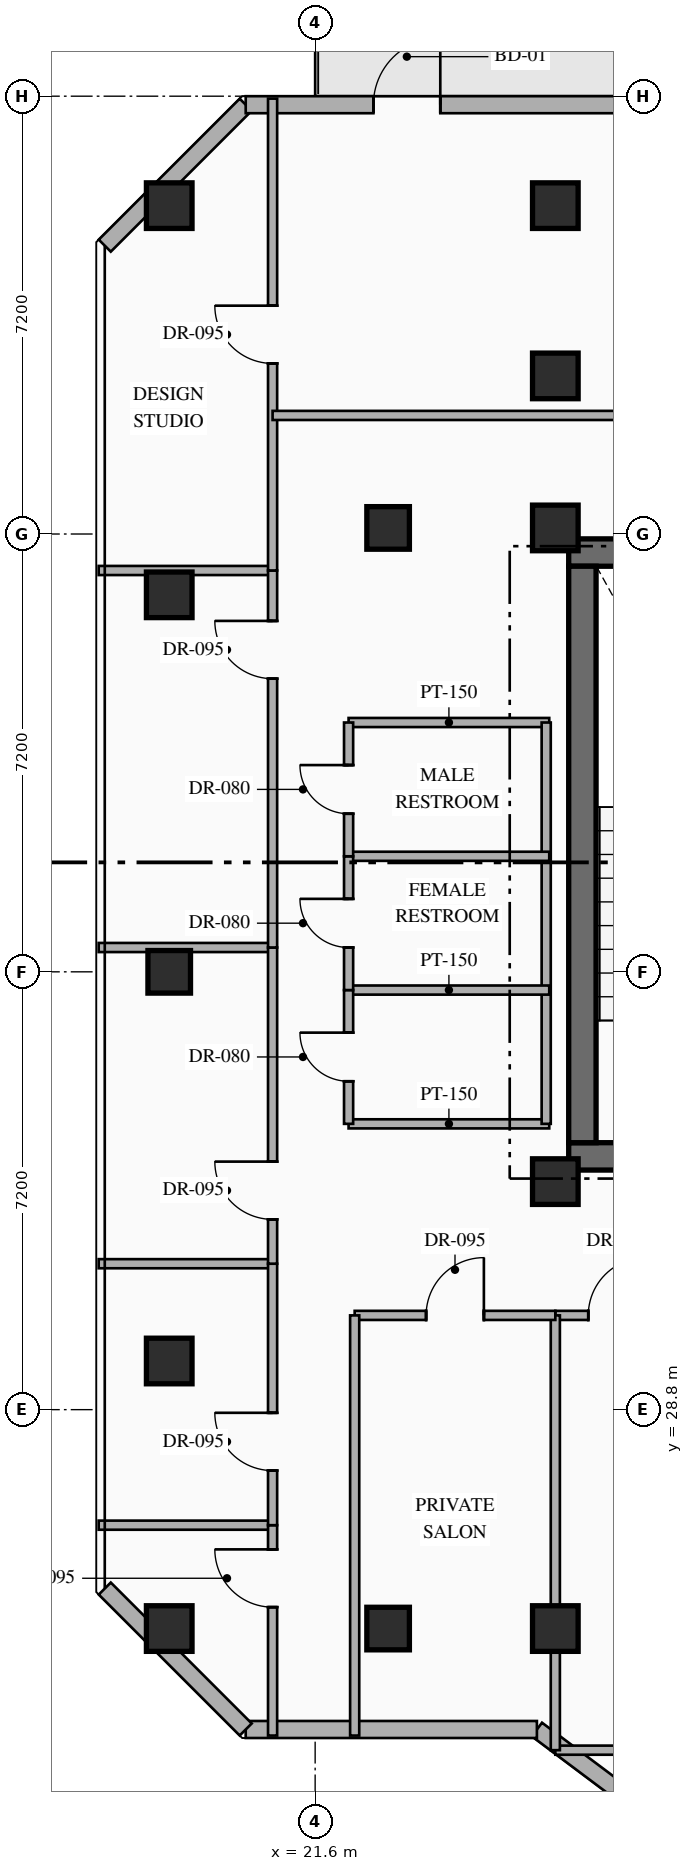
"""IFC4 building model, lengths in metres.
Left out: names, types, materials, properties, quantities, classifications, styles, units other than length and angle.
Written with IfcOpenShell. Run it as: python <this file> out.ifc"""

import sys

from ifc_helpers import new_model, si_unit, direction, frame, frame_2d, origin, origin_2d, place, context, subcontext, project, spatial, rectangle, hollow_rectangle, extrude, element, fill, save


model = new_model("IFC4")
c1 = context("Model", 3, precision=1e-05, world=origin(), true_north=direction((0.0, 1.0)))
c2 = subcontext(c1, "Body", "Model", "MODEL_VIEW")
j1 = project(units=[si_unit("LENGTHUNIT", "METRE"), si_unit("PLANEANGLEUNIT", "RADIAN")], contexts=[c1])
p1 = place(None, origin())
s1 = spatial("IfcSite", under=j1, at=p1, CompositionType="ELEMENT")
p2 = place(p1, origin())
s2 = spatial("IfcBuilding", under=s1, at=p2, CompositionType="ELEMENT")
p3 = place(p2, frame((0.0, 0.0, 213.15)))
s3 = spatial("IfcBuildingStorey", under=s2, at=p3, CompositionType="ELEMENT", Elevation=213.15)
p4 = place(p3, frame((25.77, 32.965, 0.0), z_axis=(0.0, 0.0, 1.0), x_axis=(1.0, 0.0, 0.0)))
e1 = element("IfcWall", 1, at=p4, inside=s3, PredefinedType="SHEAR", context=c2, shape_type="SweptSolid", body=[
    extrude(rectangle(XDim=7.48, YDim=0.45, at=frame_2d((3.74, 0.0))), origin(), (0.0, 0.0, 1.0), 3.6),
])
p5 = place(p4, frame((2.68, 0.0, 0.0)))
e2 = element("IfcOpeningElement", 2, at=p5, cuts=e1, PredefinedType="OPENING", context=c2, shape_type="SweptSolid", body=[
    extrude(rectangle(XDim=1.1, YDim=2.2, at=frame_2d((0.55, 1.1))), frame((0.0, 0.235, 0.0), z_axis=(0.0, -1.0, 0.0), x_axis=(1.0, 0.0, 0.0)), (0.0, 0.0, 1.0), 0.47),
])
p6 = place(p4, frame((5.43, 0.0, 0.0)))
e3 = element("IfcOpeningElement", 3, at=p6, cuts=e1, PredefinedType="OPENING", context=c2, shape_type="SweptSolid", body=[
    extrude(rectangle(XDim=1.1, YDim=2.15, at=frame_2d((0.55, 1.075))), frame((0.0, 0.235, 0.0), z_axis=(0.0, -1.0, 0.0), x_axis=(1.0, 0.0, 0.0)), (0.0, 0.0, 1.0), 0.47),
])
p7 = place(p3, frame((25.77, 42.895, 0.0), z_axis=(0.0, 0.0, 1.0), x_axis=(1.0, 0.0, 0.0)))
e4 = element("IfcWall", 4, at=p7, inside=s3, PredefinedType="SHEAR", context=c2, shape_type="SweptSolid", body=[
    extrude(rectangle(XDim=7.48, YDim=0.45, at=frame_2d((3.74, 0.0))), origin(), (0.0, 0.0, 1.0), 3.6),
])
p8 = place(p3, frame((25.995, 33.19, 0.0), z_axis=(0.0, 0.0, 1.0), x_axis=(0.0, 1.0, 0.0)))
e5 = element("IfcWall", 5, at=p8, inside=s3, PredefinedType="SHEAR", context=c2, shape_type="SweptSolid", body=[
    extrude(rectangle(XDim=9.48, YDim=0.45, at=frame_2d((4.74, 0.0))), origin(), (0.0, 0.0, 1.0), 3.6),
])
for number, where, z_axis, x_axis in (
    (6, (25.55, 32.55, 0.0), (0.0, 0.0, 1.0), (1.0, 0.0, 0.0)),
    (7, (25.55, 43.3, 0.0), (0.0, 0.0, 1.0), (1.0, 0.0, 0.0)),
    (8, (25.55, 25.2, 0.0), (0.0, 0.0, 1.0), (1.0, 0.0, 0.0)),
    (9, (25.55, 45.8, 0.0), (0.0, 0.0, 1.0), (1.0, 0.0, 0.0)),
    (10, (19.2, 48.6, 0.0), (0.0, 0.0, 1.0), (1.0, 0.0, 0.0)),
    (11, (25.55, 48.6, 0.0), (0.0, 0.0, 1.0), (1.0, 0.0, 0.0)),
    (12, (19.2, 25.2, 0.0), (0.0, 0.0, 1.0), (1.0, 0.0, 0.0)),
    (13, (19.2, 29.6, 0.0), (0.0, 0.0, 1.0), (1.0, 0.0, 0.0)),
    (14, (19.2, 42.2, 0.0), (0.0, 0.0, 1.0), (1.0, 0.0, 0.0)),
):
    element("IfcColumn", number, at=place(p3, frame(where, z_axis=z_axis, x_axis=x_axis)), inside=s3, PredefinedType="COLUMN", context=c2, shape_type="SweptSolid", body=[
        extrude(hollow_rectangle(XDim=0.75, YDim=0.75, WallThickness=0.028, at=origin_2d()), origin(), (0.0, 0.0, 1.0), 3.6),
    ])
for number, where, z_axis, x_axis in (
    (15, (22.8, 25.2, 0.0), (0.0, 0.0, 1.0), (1.0, 0.0, 0.0)),
    (16, (22.8, 43.3, 0.0), (0.0, 0.0, 1.0), (1.0, 0.0, 0.0)),
    (17, (19.2, 36.0, 0.0), (0.0, 0.0, 1.0), (1.0, 0.0, 0.0)),
):
    element("IfcColumn", number, at=place(p3, frame(where, z_axis=z_axis, x_axis=x_axis)), inside=s3, PredefinedType="COLUMN", context=c2, shape_type="SweptSolid", body=[
        extrude(hollow_rectangle(XDim=0.7, YDim=0.7, WallThickness=0.028, at=origin_2d()), origin(), (0.0, 0.0, 1.0), 3.6),
    ])
p9 = place(p3, frame((44.918, 8.787, 0.0), z_axis=(0.0, 0.0, 1.0), x_axis=(-0.800004765927, 0.599993645378, 0.0)))
e18 = element("IfcWall", 18, at=p9, inside=s3, PredefinedType="STANDARD", context=c2, shape_type="SweptSolid", body=[
    extrude(rectangle(XDim=24.588, YDim=0.28, at=frame_2d((12.294, 0.0))), origin(), (0.0, 0.0, 1.0), 3.35),
])
p10 = place(p3, frame((25.247, 23.54, 0.0), z_axis=(0.0, 0.0, 1.0), x_axis=(-1.0, 0.0, 0.0)))
e19 = element("IfcWall", 19, at=p10, inside=s3, PredefinedType="STANDARD", context=c2, shape_type="SweptSolid", body=[
    extrude(rectangle(XDim=4.789, YDim=0.28, at=frame_2d((2.395, 0.0))), origin(), (0.0, 0.0, 1.0), 3.35),
])
p11 = place(p3, frame((20.458, 23.54, 0.0), z_axis=(0.0, 0.0, 1.0), x_axis=(-0.707144017911, 0.707069542501, 0.0)))
e20 = element("IfcWall", 20, at=p11, inside=s3, PredefinedType="STANDARD", context=c2, shape_type="SweptSolid", body=[
    extrude(rectangle(XDim=3.278, YDim=0.28, at=frame_2d((1.639, 0.0))), origin(), (0.0, 0.0, 1.0), 3.35),
])
p12 = place(p3, frame((18.14, 47.942, 0.0), z_axis=(0.0, 0.0, 1.0), x_axis=(0.707106781187, 0.707106781187, 0.0)))
e21 = element("IfcWall", 21, at=p12, inside=s3, PredefinedType="STANDARD", context=c2, shape_type="SweptSolid", body=[
    extrude(rectangle(XDim=3.278, YDim=0.28, at=frame_2d((1.639, 0.0))), origin(), (0.0, 0.0, 1.0), 3.35),
])
p13 = place(p3, frame((20.458, 50.26, 0.0), z_axis=(0.0, 0.0, 1.0), x_axis=(1.0, 0.0, 0.0)))
e22 = element("IfcWall", 22, at=p13, inside=s3, PredefinedType="STANDARD", context=c2, shape_type="SweptSolid", body=[
    extrude(rectangle(XDim=22.084, YDim=0.28, at=frame_2d((11.042, 0.0))), origin(), (0.0, 0.0, 1.0), 3.35),
])
p14 = place(p13, frame((2.1, 0.0, 0.0)))
e23 = element("IfcOpeningElement", 23, at=p14, cuts=e22, PredefinedType="OPENING", context=c2, shape_type="SweptSolid", body=[
    extrude(rectangle(XDim=1.1, YDim=2.2, at=frame_2d((0.55, 1.1))), frame((0.0, 0.15, 0.0), z_axis=(0.0, -1.0, 0.0), x_axis=(1.0, 0.0, 0.0)), (0.0, 0.0, 1.0), 0.3),
])
p15 = place(p13, frame((15.663, 0.0, 0.85)))
e24 = element("IfcOpeningElement", 24, at=p15, cuts=e22, PredefinedType="OPENING", context=c2, shape_type="SweptSolid", body=[
    extrude(rectangle(XDim=1.8, YDim=2.1, at=frame_2d((0.9, 1.05))), frame((0.0, 0.15, 0.0), z_axis=(0.0, -1.0, 0.0), x_axis=(1.0, 0.0, 0.0)), (0.0, 0.0, 1.0), 0.3),
])
for number, where, z_axis, x_axis in (
    (25, (22.15, 33.5, 0.0), (0.0, 0.0, 1.0), (1.0, 0.0, 0.0)),
    (26, (22.15, 40.1, 0.0), (0.0, 0.0, 1.0), (1.0, 0.0, 0.0)),
):
    element("IfcWall", number, at=place(p3, frame(where, z_axis=z_axis, x_axis=x_axis)), inside=s3, PredefinedType="PARTITIONING", context=c2, shape_type="SweptSolid", body=[
        extrude(rectangle(XDim=3.3, YDim=0.15, at=frame_2d((1.65, 0.0))), origin(), (0.0, 0.0, 1.0), 3.35),
    ])
p16 = place(p3, frame((25.4, 33.5, 0.0), z_axis=(0.0, 0.0, 1.0), x_axis=(0.0, 1.0, 0.0)))
e27 = element("IfcWall", 27, at=p16, inside=s3, PredefinedType="PARTITIONING", context=c2, shape_type="SweptSolid", body=[
    extrude(rectangle(XDim=6.6, YDim=0.15, at=frame_2d((3.3, 0.0))), origin(), (0.0, 0.0, 1.0), 3.35),
])
for number, where, z_axis, x_axis in (
    (28, (22.15, 35.7, 0.0), (0.0, 0.0, 1.0), (1.0, 0.0, 0.0)),
    (29, (22.15, 37.9, 0.0), (0.0, 0.0, 1.0), (1.0, 0.0, 0.0)),
):
    element("IfcWall", number, at=place(p3, frame(where, z_axis=z_axis, x_axis=x_axis)), inside=s3, PredefinedType="PARTITIONING", context=c2, shape_type="SweptSolid", body=[
        extrude(rectangle(XDim=3.3, YDim=0.15, at=frame_2d((1.65, 0.0))), origin(), (0.0, 0.0, 1.0), 3.35),
    ])
p17 = place(p3, frame((22.15, 33.5, 0.0), z_axis=(0.0, 0.0, 1.0), x_axis=(0.0, 1.0, 0.0)))
e30 = element("IfcWall", 30, at=p17, inside=s3, PredefinedType="PARTITIONING", context=c2, shape_type="SweptSolid", body=[
    extrude(rectangle(XDim=2.2, YDim=0.15, at=frame_2d((1.1, 0.0))), origin(), (0.0, 0.0, 1.0), 3.35),
])
p18 = place(p17, frame((0.7, 0.0, 0.0)))
e31 = element("IfcOpeningElement", 31, at=p18, cuts=e30, PredefinedType="OPENING", context=c2, shape_type="SweptSolid", body=[
    extrude(rectangle(XDim=0.8, YDim=2.06, at=frame_2d((0.4, 1.03))), frame((0.0, 0.085, 0.0), z_axis=(0.0, -1.0, 0.0), x_axis=(1.0, 0.0, 0.0)), (0.0, 0.0, 1.0), 0.17),
])
p19 = place(p3, frame((22.15, 35.7, 0.0), z_axis=(0.0, 0.0, 1.0), x_axis=(0.0, 1.0, 0.0)))
e32 = element("IfcWall", 32, at=p19, inside=s3, PredefinedType="PARTITIONING", context=c2, shape_type="SweptSolid", body=[
    extrude(rectangle(XDim=2.2, YDim=0.15, at=frame_2d((1.1, 0.0))), origin(), (0.0, 0.0, 1.0), 3.35),
])
p20 = place(p19, frame((0.7, 0.0, 0.0)))
e33 = element("IfcOpeningElement", 33, at=p20, cuts=e32, PredefinedType="OPENING", context=c2, shape_type="SweptSolid", body=[
    extrude(rectangle(XDim=0.8, YDim=2.06, at=frame_2d((0.4, 1.03))), frame((0.0, 0.085, 0.0), z_axis=(0.0, -1.0, 0.0), x_axis=(1.0, 0.0, 0.0)), (0.0, 0.0, 1.0), 0.17),
])
p21 = place(p3, frame((22.15, 37.9, 0.0), z_axis=(0.0, 0.0, 1.0), x_axis=(0.0, 1.0, 0.0)))
e34 = element("IfcWall", 34, at=p21, inside=s3, PredefinedType="PARTITIONING", context=c2, shape_type="SweptSolid", body=[
    extrude(rectangle(XDim=2.2, YDim=0.15, at=frame_2d((1.1, 0.0))), origin(), (0.0, 0.0, 1.0), 3.35),
])
p22 = place(p21, frame((0.7, 0.0, 0.0)))
e35 = element("IfcOpeningElement", 35, at=p22, cuts=e34, PredefinedType="OPENING", context=c2, shape_type="SweptSolid", body=[
    extrude(rectangle(XDim=0.8, YDim=2.06, at=frame_2d((0.4, 1.03))), frame((0.0, 0.085, 0.0), z_axis=(0.0, -1.0, 0.0), x_axis=(1.0, 0.0, 0.0)), (0.0, 0.0, 1.0), 0.17),
])
p23 = place(p3, frame((25.55, 23.2, 0.0), z_axis=(0.0, 0.0, 1.0), x_axis=(1.0, 0.0, 0.0)))
e36 = element("IfcWall", 36, at=p23, inside=s3, PredefinedType="PARTITIONING", context=c2, shape_type="SweptSolid", body=[
    extrude(rectangle(XDim=4.95, YDim=0.15, at=frame_2d((2.475, 0.0))), origin(), (0.0, 0.0, 1.0), 3.35),
])
p24 = place(p3, frame((25.55, 30.35, 0.0), z_axis=(0.0, 0.0, 1.0), x_axis=(1.0, 0.0, 0.0)))
e37 = element("IfcWall", 37, at=p24, inside=s3, PredefinedType="PARTITIONING", context=c2, shape_type="SweptSolid", body=[
    extrude(rectangle(XDim=4.95, YDim=0.15, at=frame_2d((2.475, 0.0))), origin(), (0.0, 0.0, 1.0), 3.35),
])
p25 = place(p24, frame((0.542, 0.0, 0.0)))
e38 = element("IfcOpeningElement", 38, at=p25, cuts=e37, PredefinedType="OPENING", context=c2, shape_type="SweptSolid", body=[
    extrude(rectangle(XDim=0.95, YDim=2.15, at=frame_2d((0.475, 1.075))), frame((0.0, 0.085, 0.0), z_axis=(0.0, -1.0, 0.0), x_axis=(1.0, 0.0, 0.0)), (0.0, 0.0, 1.0), 0.17),
])
p26 = place(p3, frame((25.55, 23.2, 0.0), z_axis=(0.0, 0.0, 1.0), x_axis=(0.0, 1.0, 0.0)))
e39 = element("IfcWall", 39, at=p26, inside=s3, PredefinedType="PARTITIONING", context=c2, shape_type="SweptSolid", body=[
    extrude(rectangle(XDim=7.15, YDim=0.15, at=frame_2d((3.575, 0.0))), origin(), (0.0, 0.0, 1.0), 2.757),
])
p27 = place(p3, frame((18.04, 26.9, 0.0), z_axis=(0.0, 0.0, 1.0), x_axis=(1.0, 0.0, 0.0)))
e40 = element("IfcWall", 40, at=p27, inside=s3, PredefinedType="PARTITIONING", context=c2, shape_type="SweptSolid", body=[
    extrude(rectangle(XDim=2.86, YDim=0.15, at=frame_2d((1.43, 0.0))), origin(), (0.0, 0.0, 1.0), 3.35),
])
p28 = place(p3, frame((20.9, 23.44, 0.0), z_axis=(0.0, 0.0, 1.0), x_axis=(0.0, 1.0, 0.0)))
e41 = element("IfcWall", 41, at=p28, inside=s3, PredefinedType="PARTITIONING", context=c2, shape_type="SweptSolid", body=[
    extrude(rectangle(XDim=3.46, YDim=0.15, at=frame_2d((1.73, 0.0))), origin(), (0.0, 0.0, 1.0), 3.35),
])
p29 = place(p28, frame((2.112, 0.0, 0.0)))
e42 = element("IfcOpeningElement", 42, at=p29, cuts=e41, PredefinedType="OPENING", context=c2, shape_type="SweptSolid", body=[
    extrude(rectangle(XDim=0.95, YDim=2.15, at=frame_2d((0.475, 1.075))), frame((0.0, 0.085, 0.0), z_axis=(0.0, -1.0, 0.0), x_axis=(1.0, 0.0, 0.0)), (0.0, 0.0, 1.0), 0.17),
])
p30 = place(p3, frame((18.04, 31.2, 0.0), z_axis=(0.0, 0.0, 1.0), x_axis=(1.0, 0.0, 0.0)))
e43 = element("IfcWall", 43, at=p30, inside=s3, PredefinedType="PARTITIONING", context=c2, shape_type="SweptSolid", body=[
    extrude(rectangle(XDim=2.86, YDim=0.15, at=frame_2d((1.43, 0.0))), origin(), (0.0, 0.0, 1.0), 3.35),
])
p31 = place(p3, frame((20.9, 26.9, 0.0), z_axis=(0.0, 0.0, 1.0), x_axis=(0.0, 1.0, 0.0)))
e44 = element("IfcWall", 44, at=p31, inside=s3, PredefinedType="PARTITIONING", context=c2, shape_type="SweptSolid", body=[
    extrude(rectangle(XDim=4.3, YDim=0.15, at=frame_2d((2.15, 0.0))), origin(), (0.0, 0.0, 1.0), 3.35),
])
p32 = place(p31, frame((0.898, 0.0, 0.0)))
e45 = element("IfcOpeningElement", 45, at=p32, cuts=e44, PredefinedType="OPENING", context=c2, shape_type="SweptSolid", body=[
    extrude(rectangle(XDim=0.95, YDim=2.15, at=frame_2d((0.475, 1.075))), frame((0.0, 0.085, 0.0), z_axis=(0.0, -1.0, 0.0), x_axis=(1.0, 0.0, 0.0)), (0.0, 0.0, 1.0), 0.17),
])
p33 = place(p3, frame((18.04, 36.4, 0.0), z_axis=(0.0, 0.0, 1.0), x_axis=(1.0, 0.0, 0.0)))
e46 = element("IfcWall", 46, at=p33, inside=s3, PredefinedType="PARTITIONING", context=c2, shape_type="SweptSolid", body=[
    extrude(rectangle(XDim=2.86, YDim=0.15, at=frame_2d((1.43, 0.0))), origin(), (0.0, 0.0, 1.0), 3.35),
])
p34 = place(p3, frame((20.9, 31.2, 0.0), z_axis=(0.0, 0.0, 1.0), x_axis=(0.0, 1.0, 0.0)))
e47 = element("IfcWall", 47, at=p34, inside=s3, PredefinedType="PARTITIONING", context=c2, shape_type="SweptSolid", body=[
    extrude(rectangle(XDim=5.2, YDim=0.15, at=frame_2d((2.6, 0.0))), origin(), (0.0, 0.0, 1.0), 3.35),
])
p35 = place(p34, frame((0.729, 0.0, 0.0)))
e48 = element("IfcOpeningElement", 48, at=p35, cuts=e47, PredefinedType="OPENING", context=c2, shape_type="SweptSolid", body=[
    extrude(rectangle(XDim=0.95, YDim=2.15, at=frame_2d((0.475, 1.075))), frame((0.0, 0.085, 0.0), z_axis=(0.0, -1.0, 0.0), x_axis=(1.0, 0.0, 0.0)), (0.0, 0.0, 1.0), 0.17),
])
p36 = place(p3, frame((18.04, 42.6, 0.0), z_axis=(0.0, 0.0, 1.0), x_axis=(1.0, 0.0, 0.0)))
e49 = element("IfcWall", 49, at=p36, inside=s3, PredefinedType="PARTITIONING", context=c2, shape_type="SweptSolid", body=[
    extrude(rectangle(XDim=2.86, YDim=0.15, at=frame_2d((1.43, 0.0))), origin(), (0.0, 0.0, 1.0), 3.35),
])
p37 = place(p3, frame((20.9, 36.4, 0.0), z_axis=(0.0, 0.0, 1.0), x_axis=(0.0, 1.0, 0.0)))
e50 = element("IfcWall", 50, at=p37, inside=s3, PredefinedType="PARTITIONING", context=c2, shape_type="SweptSolid", body=[
    extrude(rectangle(XDim=6.2, YDim=0.15, at=frame_2d((3.1, 0.0))), origin(), (0.0, 0.0, 1.0), 3.35),
])
p38 = place(p37, frame((4.421, 0.0, 0.0)))
e51 = element("IfcOpeningElement", 51, at=p38, cuts=e50, PredefinedType="OPENING", context=c2, shape_type="SweptSolid", body=[
    extrude(rectangle(XDim=0.95, YDim=2.15, at=frame_2d((0.475, 1.075))), frame((0.0, 0.085, 0.0), z_axis=(0.0, -1.0, 0.0), x_axis=(1.0, 0.0, 0.0)), (0.0, 0.0, 1.0), 0.17),
])
p39 = place(p3, frame((20.9, 42.6, 0.0), z_axis=(0.0, 0.0, 1.0), x_axis=(0.0, 1.0, 0.0)))
e52 = element("IfcWall", 52, at=p39, inside=s3, PredefinedType="PARTITIONING", context=c2, shape_type="SweptSolid", body=[
    extrude(rectangle(XDim=7.76, YDim=0.15, at=frame_2d((3.88, 0.0))), origin(), (0.0, 0.0, 1.0), 3.35),
])
p40 = place(p39, frame((3.405, 0.0, 0.0)))
e53 = element("IfcOpeningElement", 53, at=p40, cuts=e52, PredefinedType="OPENING", context=c2, shape_type="SweptSolid", body=[
    extrude(rectangle(XDim=0.95, YDim=2.15, at=frame_2d((0.475, 1.075))), frame((0.0, 0.085, 0.0), z_axis=(0.0, -1.0, 0.0), x_axis=(1.0, 0.0, 0.0)), (0.0, 0.0, 1.0), 0.17),
])
p41 = place(p3, frame((20.9, 45.15, 0.0), z_axis=(0.0, 0.0, 1.0), x_axis=(1.0, 0.0, 0.0)))
e54 = element("IfcWall", 54, at=p41, inside=s3, PredefinedType="PARTITIONING", context=c2, shape_type="SweptSolid", body=[
    extrude(rectangle(XDim=24.06, YDim=0.15, at=frame_2d((12.03, 0.0))), origin(), (0.0, 0.0, 1.0), 3.35),
])
p42 = place(p41, frame((9.32, 0.0, 0.0)))
e55 = element("IfcOpeningElement", 55, at=p42, cuts=e54, PredefinedType="OPENING", context=c2, shape_type="SweptSolid", body=[
    extrude(rectangle(XDim=0.95, YDim=2.15, at=frame_2d((0.475, 1.075))), frame((0.0, 0.085, 0.0), z_axis=(0.0, -1.0, 0.0), x_axis=(1.0, 0.0, 0.0)), (0.0, 0.0, 1.0), 0.17),
])
p43 = place(p3, frame((22.25, 30.35, 0.0), z_axis=(0.0, 0.0, 1.0), x_axis=(1.0, 0.0, 0.0)))
e56 = element("IfcWall", 56, at=p43, inside=s3, PredefinedType="PARTITIONING", context=c2, shape_type="SweptSolid", body=[
    extrude(rectangle(XDim=3.3, YDim=0.15, at=frame_2d((1.65, 0.0))), origin(), (0.0, 0.0, 1.0), 3.35),
])
p44 = place(p43, frame((1.175, 0.0, 0.0)))
e57 = element("IfcOpeningElement", 57, at=p44, cuts=e56, PredefinedType="OPENING", context=c2, shape_type="SweptSolid", body=[
    extrude(rectangle(XDim=0.95, YDim=2.15, at=frame_2d((0.475, 1.075))), frame((0.0, 0.085, 0.0), z_axis=(0.0, -1.0, 0.0), x_axis=(1.0, 0.0, 0.0)), (0.0, 0.0, 1.0), 0.17),
])
p45 = place(p3, frame((22.25, 23.44, 0.0), z_axis=(0.0, 0.0, 1.0), x_axis=(0.0, 1.0, 0.0)))
e58 = element("IfcWall", 58, at=p45, inside=s3, PredefinedType="PARTITIONING", context=c2, shape_type="SweptSolid", body=[
    extrude(rectangle(XDim=6.91, YDim=0.15, at=frame_2d((3.455, 0.0))), origin(), (0.0, 0.0, 1.0), 3.35),
])
p46 = place(p14, origin())
e59 = element("IfcDoor", 59, at=p46, inside=s3, OperationType="SINGLE_SWING_RIGHT", PredefinedType="DOOR", context=c2, shape_type="SweptSolid", body=[
    extrude(rectangle(XDim=1.1, YDim=2.2, at=frame_2d((0.55, 1.1))), frame((0.0, 0.025, 0.0), z_axis=(0.0, -1.0, 0.0), x_axis=(1.0, 0.0, 0.0)), (0.0, 0.0, 1.0), 0.05),
])
fill(e23, e59)
p47 = place(p18, origin())
e60 = element("IfcDoor", 60, at=p47, inside=s3, OperationType="SINGLE_SWING_RIGHT", PredefinedType="DOOR", context=c2, shape_type="SweptSolid", body=[
    extrude(rectangle(XDim=0.8, YDim=2.06, at=frame_2d((0.4, 1.03))), frame((0.0, 0.025, 0.0), z_axis=(0.0, -1.0, 0.0), x_axis=(1.0, 0.0, 0.0)), (0.0, 0.0, 1.0), 0.05),
])
fill(e31, e60)
p48 = place(p20, origin())
e61 = element("IfcDoor", 61, at=p48, inside=s3, OperationType="SINGLE_SWING_RIGHT", PredefinedType="DOOR", context=c2, shape_type="SweptSolid", body=[
    extrude(rectangle(XDim=0.8, YDim=2.06, at=frame_2d((0.4, 1.03))), frame((0.0, 0.025, 0.0), z_axis=(0.0, -1.0, 0.0), x_axis=(1.0, 0.0, 0.0)), (0.0, 0.0, 1.0), 0.05),
])
fill(e33, e61)
p49 = place(p22, origin())
e62 = element("IfcDoor", 62, at=p49, inside=s3, OperationType="SINGLE_SWING_RIGHT", PredefinedType="DOOR", context=c2, shape_type="SweptSolid", body=[
    extrude(rectangle(XDim=0.8, YDim=2.06, at=frame_2d((0.4, 1.03))), frame((0.0, 0.025, 0.0), z_axis=(0.0, -1.0, 0.0), x_axis=(1.0, 0.0, 0.0)), (0.0, 0.0, 1.0), 0.05),
])
fill(e35, e62)
p50 = place(p25, origin())
e63 = element("IfcDoor", 63, at=p50, inside=s3, OperationType="SINGLE_SWING_RIGHT", PredefinedType="DOOR", context=c2, shape_type="SweptSolid", body=[
    extrude(rectangle(XDim=0.95, YDim=2.15, at=frame_2d((0.475, 1.075))), frame((0.0, 0.025, 0.0), z_axis=(0.0, -1.0, 0.0), x_axis=(1.0, 0.0, 0.0)), (0.0, 0.0, 1.0), 0.05),
])
fill(e38, e63)
p51 = place(p29, origin())
e64 = element("IfcDoor", 64, at=p51, inside=s3, OperationType="SINGLE_SWING_RIGHT", PredefinedType="DOOR", context=c2, shape_type="SweptSolid", body=[
    extrude(rectangle(XDim=0.95, YDim=2.15, at=frame_2d((0.475, 1.075))), frame((0.0, 0.025, 0.0), z_axis=(0.0, -1.0, 0.0), x_axis=(1.0, 0.0, 0.0)), (0.0, 0.0, 1.0), 0.05),
])
fill(e42, e64)
p52 = place(p32, origin())
e65 = element("IfcDoor", 65, at=p52, inside=s3, OperationType="SINGLE_SWING_RIGHT", PredefinedType="DOOR", context=c2, shape_type="SweptSolid", body=[
    extrude(rectangle(XDim=0.95, YDim=2.15, at=frame_2d((0.475, 1.075))), frame((0.0, 0.025, 0.0), z_axis=(0.0, -1.0, 0.0), x_axis=(1.0, 0.0, 0.0)), (0.0, 0.0, 1.0), 0.05),
])
fill(e45, e65)
p53 = place(p35, origin())
e66 = element("IfcDoor", 66, at=p53, inside=s3, OperationType="SINGLE_SWING_RIGHT", PredefinedType="DOOR", context=c2, shape_type="SweptSolid", body=[
    extrude(rectangle(XDim=0.95, YDim=2.15, at=frame_2d((0.475, 1.075))), frame((0.0, 0.025, 0.0), z_axis=(0.0, -1.0, 0.0), x_axis=(1.0, 0.0, 0.0)), (0.0, 0.0, 1.0), 0.05),
])
fill(e48, e66)
p54 = place(p38, origin())
e67 = element("IfcDoor", 67, at=p54, inside=s3, OperationType="SINGLE_SWING_RIGHT", PredefinedType="DOOR", context=c2, shape_type="SweptSolid", body=[
    extrude(rectangle(XDim=0.95, YDim=2.15, at=frame_2d((0.475, 1.075))), frame((0.0, 0.025, 0.0), z_axis=(0.0, -1.0, 0.0), x_axis=(1.0, 0.0, 0.0)), (0.0, 0.0, 1.0), 0.05),
])
fill(e51, e67)
p55 = place(p40, origin())
e68 = element("IfcDoor", 68, at=p55, inside=s3, OperationType="SINGLE_SWING_RIGHT", PredefinedType="DOOR", context=c2, shape_type="SweptSolid", body=[
    extrude(rectangle(XDim=0.95, YDim=2.15, at=frame_2d((0.475, 1.075))), frame((0.0, 0.025, 0.0), z_axis=(0.0, -1.0, 0.0), x_axis=(1.0, 0.0, 0.0)), (0.0, 0.0, 1.0), 0.05),
])
fill(e53, e68)
p56 = place(p44, origin())
e69 = element("IfcDoor", 69, at=p56, inside=s3, OperationType="SINGLE_SWING_RIGHT", PredefinedType="DOOR", context=c2, shape_type="SweptSolid", body=[
    extrude(rectangle(XDim=0.95, YDim=2.15, at=frame_2d((0.475, 1.075))), frame((0.0, 0.025, 0.0), z_axis=(0.0, -1.0, 0.0), x_axis=(1.0, 0.0, 0.0)), (0.0, 0.0, 1.0), 0.05),
])
fill(e57, e69)
save(model, sys.argv[1])
